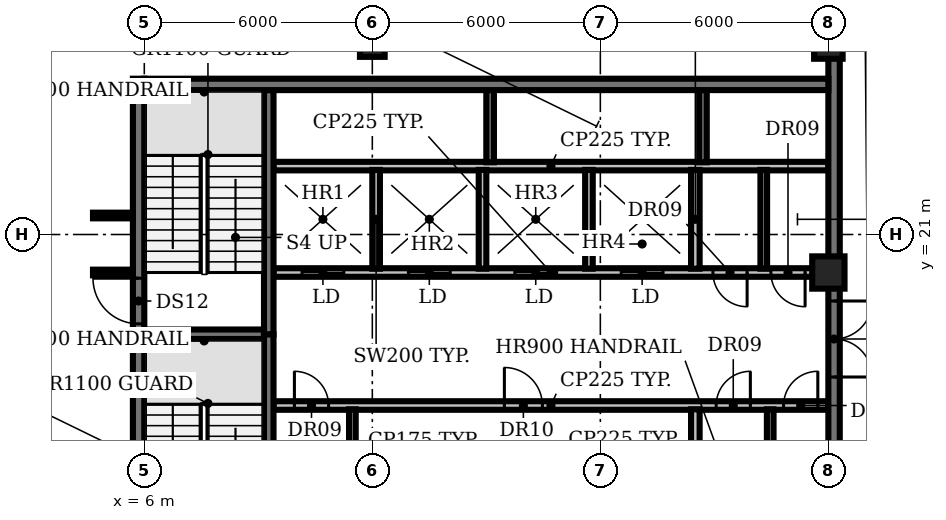
"""IFC4 building model, lengths in metres.
Left out: names, types, materials, properties, quantities, classifications, styles, units other than length and angle.
Written with IfcOpenShell. Run it as: python <this file> out.ifc"""

import sys

from ifc_helpers import new_model, si_unit, direction, frame, frame_2d, origin, origin_2d, place, context, subcontext, project, spatial, rectangle, circle, extrude, element, fill, save


model = new_model("IFC4")
c1 = context("Model", 3, precision=1e-05, world=origin(), true_north=direction((0.0, 1.0)))
c2 = subcontext(c1, "Body", "Model", "MODEL_VIEW")
j1 = project(units=[si_unit("LENGTHUNIT", "METRE"), si_unit("PLANEANGLEUNIT", "RADIAN")], contexts=[c1])
p1 = place(None, origin())
s1 = spatial("IfcSite", under=j1, at=p1, CompositionType="ELEMENT")
p2 = place(p1, origin())
s2 = spatial("IfcBuilding", under=s1, at=p2, CompositionType="ELEMENT")
p3 = place(p2, frame((0.0, 0.0, 289.4)))
s3 = spatial("IfcBuildingStorey", under=s2, at=p3, CompositionType="ELEMENT", Elevation=289.4)
p4 = place(p3, frame((12.0, 26.0, 0.0), z_axis=(0.0, 0.0, 1.0), x_axis=(1.0, 0.0, 0.0)))
e1 = element("IfcColumn", 1, at=p4, inside=s3, PredefinedType="COLUMN", context=c2, shape_type="SweptSolid", body=[
    extrude(rectangle(XDim=0.65, YDim=0.65, at=origin_2d()), origin(), (0.0, 0.0, 1.0), 3.85),
])
p5 = place(p3, frame((24.0, 20.0, 0.0), z_axis=(0.0, 0.0, 1.0), x_axis=(1.0, 0.0, 0.0)))
e2 = element("IfcColumn", 2, at=p5, inside=s3, PredefinedType="COLUMN", context=c2, shape_type="SweptSolid", body=[
    extrude(circle(Radius=0.425, at=origin_2d()), origin(), (0.0, 0.0, 1.0), 3.85),
])
p6 = place(p3, frame((24.0, 26.0, 0.0), z_axis=(0.0, 0.0, 1.0), x_axis=(1.0, 0.0, 0.0)))
e3 = element("IfcColumn", 3, at=p6, inside=s3, PredefinedType="COLUMN", context=c2, shape_type="SweptSolid", body=[
    extrude(rectangle(XDim=0.75, YDim=0.75, at=origin_2d()), origin(), (0.0, 0.0, 1.0), 3.85),
])
p7 = place(p3, frame((9.4, 16.5, 0.0), z_axis=(0.0, 0.0, 1.0), x_axis=(1.0, 0.0, 0.0)))
e4 = element("IfcWall", 4, at=p7, inside=s3, PredefinedType="PARTITIONING", context=c2, shape_type="SweptSolid", body=[
    extrude(rectangle(XDim=14.6, YDim=0.225, at=frame_2d((7.3, 0.0))), origin(), (0.0, 0.0, 1.0), 3.85),
])
p8 = place(p7, frame((0.55, 0.0, 0.0)))
e5 = element("IfcOpeningElement", 5, at=p8, cuts=e4, PredefinedType="OPENING", context=c2, shape_type="SweptSolid", body=[
    extrude(rectangle(XDim=0.9, YDim=2.1, at=frame_2d((0.45, 1.05))), frame((0.0, 0.123, 0.0), z_axis=(0.0, -1.0, 0.0), x_axis=(1.0, 0.0, 0.0)), (0.0, 0.0, 1.0), 0.245),
])
p9 = place(p7, frame((6.075, 0.0, 0.0)))
e6 = element("IfcOpeningElement", 6, at=p9, cuts=e4, PredefinedType="OPENING", context=c2, shape_type="SweptSolid", body=[
    extrude(rectangle(XDim=1.0, YDim=2.1, at=frame_2d((0.5, 1.05))), frame((0.0, 0.123, 0.0), z_axis=(0.0, -1.0, 0.0), x_axis=(1.0, 0.0, 0.0)), (0.0, 0.0, 1.0), 0.245),
])
p10 = place(p7, frame((11.647, 0.0, 0.0)))
e7 = element("IfcOpeningElement", 7, at=p10, cuts=e4, PredefinedType="OPENING", context=c2, shape_type="SweptSolid", body=[
    extrude(rectangle(XDim=0.9, YDim=2.1, at=frame_2d((0.45, 1.05))), frame((0.0, 0.123, 0.0), z_axis=(0.0, -1.0, 0.0), x_axis=(1.0, 0.0, 0.0)), (0.0, 0.0, 1.0), 0.245),
])
p11 = place(p7, frame((13.423, 0.0, 0.0)))
e8 = element("IfcOpeningElement", 8, at=p11, cuts=e4, PredefinedType="OPENING", context=c2, shape_type="SweptSolid", body=[
    extrude(rectangle(XDim=0.9, YDim=2.1, at=frame_2d((0.45, 1.05))), frame((0.0, 0.123, 0.0), z_axis=(0.0, -1.0, 0.0), x_axis=(1.0, 0.0, 0.0)), (0.0, 0.0, 1.0), 0.245),
])
p12 = place(p3, frame((6.0, 18.375, 0.0), z_axis=(0.0, 0.0, 1.0), x_axis=(1.0, 0.0, 0.0)))
e9 = element("IfcWall", 9, at=p12, inside=s3, PredefinedType="SHEAR", context=c2, shape_type="SweptSolid", body=[
    extrude(rectangle(XDim=3.15, YDim=0.25, at=frame_2d((1.575, 0.0))), origin(), (0.0, 0.0, 1.0), 3.85),
])
p13 = place(p3, frame((24.0, 20.0, 0.0), z_axis=(0.0, 0.0, 1.0), x_axis=(-1.0, 0.0, 0.0)))
e10 = element("IfcWall", 10, at=p13, inside=s3, PredefinedType="PARTITIONING", context=c2, shape_type="SweptSolid", body=[
    extrude(rectangle(XDim=14.6, YDim=0.225, at=frame_2d((7.3, 0.0))), origin(), (0.0, 0.0, 1.0), 3.85),
])
p14 = place(p13, frame((12.75, 0.0, 0.0)))
e11 = element("IfcOpeningElement", 11, at=p14, cuts=e10, PredefinedType="OPENING", context=c2, shape_type="SweptSolid", body=[
    extrude(rectangle(XDim=1.1, YDim=2.1, at=frame_2d((0.55, 1.05))), frame((0.0, 0.123, 0.0), z_axis=(0.0, -1.0, 0.0), x_axis=(1.0, 0.0, 0.0)), (0.0, 0.0, 1.0), 0.245),
])
p15 = place(p13, frame((9.95, 0.0, 0.0)))
e12 = element("IfcOpeningElement", 12, at=p15, cuts=e10, PredefinedType="OPENING", context=c2, shape_type="SweptSolid", body=[
    extrude(rectangle(XDim=1.1, YDim=2.1, at=frame_2d((0.55, 1.05))), frame((0.0, 0.123, 0.0), z_axis=(0.0, -1.0, 0.0), x_axis=(1.0, 0.0, 0.0)), (0.0, 0.0, 1.0), 0.245),
])
p16 = place(p13, frame((7.15, 0.0, 0.0)))
e13 = element("IfcOpeningElement", 13, at=p16, cuts=e10, PredefinedType="OPENING", context=c2, shape_type="SweptSolid", body=[
    extrude(rectangle(XDim=1.1, YDim=2.1, at=frame_2d((0.55, 1.05))), frame((0.0, 0.123, 0.0), z_axis=(0.0, -1.0, 0.0), x_axis=(1.0, 0.0, 0.0)), (0.0, 0.0, 1.0), 0.245),
])
p17 = place(p13, frame((4.35, 0.0, 0.0)))
e14 = element("IfcOpeningElement", 14, at=p17, cuts=e10, PredefinedType="OPENING", context=c2, shape_type="SweptSolid", body=[
    extrude(rectangle(XDim=1.1, YDim=2.1, at=frame_2d((0.55, 1.05))), frame((0.0, 0.123, 0.0), z_axis=(0.0, -1.0, 0.0), x_axis=(1.0, 0.0, 0.0)), (0.0, 0.0, 1.0), 0.245),
])
p18 = place(p13, frame((2.137, 0.0, 0.0)))
e15 = element("IfcOpeningElement", 15, at=p18, cuts=e10, PredefinedType="OPENING", context=c2, shape_type="SweptSolid", body=[
    extrude(rectangle(XDim=0.9, YDim=2.1, at=frame_2d((0.45, 1.05))), frame((0.0, 0.123, 0.0), z_axis=(0.0, -1.0, 0.0), x_axis=(1.0, 0.0, 0.0)), (0.0, 0.0, 1.0), 0.245),
])
p19 = place(p13, frame((0.612, 0.0, 0.0)))
e16 = element("IfcOpeningElement", 16, at=p19, cuts=e10, PredefinedType="OPENING", context=c2, shape_type="SweptSolid", body=[
    extrude(rectangle(XDim=0.9, YDim=2.1, at=frame_2d((0.45, 1.05))), frame((0.0, 0.123, 0.0), z_axis=(0.0, -1.0, 0.0), x_axis=(1.0, 0.0, 0.0)), (0.0, 0.0, 1.0), 0.245),
])
p20 = place(p3, frame((9.4, 22.8, 0.0), z_axis=(0.0, 0.0, 1.0), x_axis=(1.0, 0.0, 0.0)))
e17 = element("IfcWall", 17, at=p20, inside=s3, PredefinedType="PARTITIONING", context=c2, shape_type="SweptSolid", body=[
    extrude(rectangle(XDim=14.6, YDim=0.225, at=frame_2d((7.3, 0.0))), origin(), (0.0, 0.0, 1.0), 3.85),
])
p21 = place(p3, frame((9.275, 18.375, 0.0), z_axis=(0.0, 0.0, 1.0), x_axis=(0.0, -1.0, 0.0)))
e18 = element("IfcWall", 18, at=p21, inside=s3, PredefinedType="SHEAR", context=c2, shape_type="SweptSolid", body=[
    extrude(rectangle(XDim=6.55, YDim=0.25, at=frame_2d((3.275, 0.0))), origin(), (0.0, 0.0, 1.0), 3.85),
])
p22 = place(p21, frame((5.075, 0.0, 0.0)))
e19 = element("IfcOpeningElement", 19, at=p22, cuts=e18, PredefinedType="OPENING", context=c2, shape_type="SweptSolid", body=[
    extrude(rectangle(XDim=1.0, YDim=2.1, at=frame_2d((0.5, 1.05))), frame((0.0, 0.135, 0.0), z_axis=(0.0, -1.0, 0.0), x_axis=(1.0, 0.0, 0.0)), (0.0, 0.0, 1.0), 0.27),
])
p23 = place(p3, frame((9.275, 18.375, 0.0), z_axis=(0.0, 0.0, 1.0), x_axis=(0.0, 1.0, 0.0)))
e20 = element("IfcWall", 20, at=p23, inside=s3, PredefinedType="SHEAR", context=c2, shape_type="SweptSolid", body=[
    extrude(rectangle(XDim=6.425, YDim=0.25, at=frame_2d((3.212, 0.0))), origin(), (0.0, 0.0, 1.0), 3.85),
])
p24 = place(p3, frame((11.475, 13.8, 0.0), z_axis=(0.0, 0.0, 1.0), x_axis=(0.0, 1.0, 0.0)))
e21 = element("IfcWall", 21, at=p24, inside=s3, PredefinedType="PARTITIONING", context=c2, shape_type="SweptSolid", body=[
    extrude(rectangle(XDim=2.6, YDim=0.175, at=frame_2d((1.3, 0.0))), origin(), (0.0, 0.0, 1.0), 3.85),
])
for number, where, z_axis, x_axis in (
    (22, (12.1, 20.1, 0.0), (0.0, 0.0, 1.0), (0.0, 1.0, 0.0)),
    (23, (14.9, 20.1, 0.0), (0.0, 0.0, 1.0), (0.0, 1.0, 0.0)),
):
    element("IfcWall", number, at=place(p3, frame(where, z_axis=z_axis, x_axis=x_axis)), inside=s3, PredefinedType="SOLIDWALL", context=c2, shape_type="SweptSolid", body=[
        extrude(rectangle(XDim=2.6, YDim=0.2, at=frame_2d((1.3, 0.0))), origin(), (0.0, 0.0, 1.0), 3.85),
    ])
p25 = place(p3, frame((15.1, 22.9, 0.0), z_axis=(0.0, 0.0, 1.0), x_axis=(0.0, 1.0, 0.0)))
e24 = element("IfcWall", 24, at=p25, inside=s3, PredefinedType="SHEAR", context=c2, shape_type="SweptSolid", body=[
    extrude(rectangle(XDim=1.9, YDim=0.2, at=frame_2d((0.95, 0.0))), origin(), (0.0, 0.0, 1.0), 3.85),
])
p26 = place(p3, frame((17.7, 20.1, 0.0), z_axis=(0.0, 0.0, 1.0), x_axis=(0.0, 1.0, 0.0)))
e25 = element("IfcWall", 25, at=p26, inside=s3, PredefinedType="SOLIDWALL", context=c2, shape_type="SweptSolid", body=[
    extrude(rectangle(XDim=2.6, YDim=0.2, at=frame_2d((1.3, 0.0))), origin(), (0.0, 0.0, 1.0), 3.85),
])
for number, where, z_axis, x_axis in (
    (26, (20.5, 13.8, 0.0), (0.0, 0.0, 1.0), (0.0, 1.0, 0.0)),
    (27, (20.5, 20.1, 0.0), (0.0, 0.0, 1.0), (0.0, 1.0, 0.0)),
):
    element("IfcWall", number, at=place(p3, frame(where, z_axis=z_axis, x_axis=x_axis)), inside=s3, PredefinedType="PARTITIONING", context=c2, shape_type="SweptSolid", body=[
        extrude(rectangle(XDim=2.6, YDim=0.225, at=frame_2d((1.3, 0.0))), origin(), (0.0, 0.0, 1.0), 3.85),
    ])
p27 = place(p3, frame((20.7, 22.9, 0.0), z_axis=(0.0, 0.0, 1.0), x_axis=(0.0, 1.0, 0.0)))
e28 = element("IfcWall", 28, at=p27, inside=s3, PredefinedType="SHEAR", context=c2, shape_type="SweptSolid", body=[
    extrude(rectangle(XDim=1.9, YDim=0.2, at=frame_2d((0.95, 0.0))), origin(), (0.0, 0.0, 1.0), 3.85),
])
for number, where, z_axis, x_axis in (
    (29, (22.3, 20.1, 0.0), (0.0, 0.0, 1.0), (0.0, 1.0, 0.0)),
    (30, (22.47, 13.8, 0.0), (0.0, 0.0, 1.0), (0.0, 1.0, 0.0)),
):
    element("IfcWall", number, at=place(p3, frame(where, z_axis=z_axis, x_axis=x_axis)), inside=s3, PredefinedType="PARTITIONING", context=c2, shape_type="SweptSolid", body=[
        extrude(rectangle(XDim=2.6, YDim=0.175, at=frame_2d((1.3, 0.0))), origin(), (0.0, 0.0, 1.0), 3.85),
    ])
p28 = place(p3, frame((5.85, 5.1, 0.0), z_axis=(0.0, 0.0, 1.0), x_axis=(0.0, 1.0, 0.0)))
e31 = element("IfcWall", 31, at=p28, inside=s3, PredefinedType="SHEAR", context=c2, shape_type="SweptSolid", body=[
    extrude(rectangle(XDim=20.0, YDim=0.3, at=frame_2d((10.0, 0.0))), origin(), (0.0, 0.0, 1.0), 3.85),
])
p29 = place(p28, frame((0.55, 0.0, 0.0)))
e32 = element("IfcOpeningElement", 32, at=p29, cuts=e31, PredefinedType="OPENING", context=c2, shape_type="SweptSolid", body=[
    extrude(rectangle(XDim=1.5, YDim=2.1, at=frame_2d((0.75, 1.05))), frame((0.0, 0.16, 0.0), z_axis=(0.0, -1.0, 0.0), x_axis=(1.0, 0.0, 0.0)), (0.0, 0.0, 1.0), 0.32),
])
p30 = place(p28, frame((7.0, 0.0, 0.0)))
e33 = element("IfcOpeningElement", 33, at=p30, cuts=e31, PredefinedType="OPENING", context=c2, shape_type="SweptSolid", body=[
    extrude(rectangle(XDim=1.2, YDim=2.1, at=frame_2d((0.6, 1.05))), frame((0.0, 0.16, 0.0), z_axis=(0.0, -1.0, 0.0), x_axis=(1.0, 0.0, 0.0)), (0.0, 0.0, 1.0), 0.32),
])
p31 = place(p28, frame((13.55, 0.0, 0.0)))
e34 = element("IfcOpeningElement", 34, at=p31, cuts=e31, PredefinedType="OPENING", context=c2, shape_type="SweptSolid", body=[
    extrude(rectangle(XDim=1.2, YDim=2.1, at=frame_2d((0.6, 1.05))), frame((0.0, 0.16, 0.0), z_axis=(0.0, -1.0, 0.0), x_axis=(1.0, 0.0, 0.0)), (0.0, 0.0, 1.0), 0.32),
])
p32 = place(p3, frame((24.15, 25.655, 0.0), z_axis=(0.0, 0.0, 1.0), x_axis=(0.0, -1.0, 0.0)))
e35 = element("IfcWall", 35, at=p32, inside=s3, PredefinedType="SHEAR", context=c2, shape_type="SweptSolid", body=[
    extrude(rectangle(XDim=20.555, YDim=0.3, at=frame_2d((10.277, 0.0))), origin(), (0.0, 0.0, 1.0), 3.85),
])
p33 = place(p32, frame((18.505, 0.0, 0.0)))
e36 = element("IfcOpeningElement", 36, at=p33, cuts=e35, PredefinedType="OPENING", context=c2, shape_type="SweptSolid", body=[
    extrude(rectangle(XDim=1.5, YDim=2.1, at=frame_2d((0.75, 1.05))), frame((0.0, 0.16, 0.0), z_axis=(0.0, -1.0, 0.0), x_axis=(1.0, 0.0, 0.0)), (0.0, 0.0, 1.0), 0.32),
])
p34 = place(p32, frame((12.405, 0.0, 0.0)))
e37 = element("IfcOpeningElement", 37, at=p34, cuts=e35, PredefinedType="OPENING", context=c2, shape_type="SweptSolid", body=[
    extrude(rectangle(XDim=0.9, YDim=2.1, at=frame_2d((0.45, 1.05))), frame((0.0, 0.16, 0.0), z_axis=(0.0, -1.0, 0.0), x_axis=(1.0, 0.0, 0.0)), (0.0, 0.0, 1.0), 0.32),
])
p35 = place(p32, frame((6.405, 0.0, 0.0)))
e38 = element("IfcOpeningElement", 38, at=p35, cuts=e35, PredefinedType="OPENING", context=c2, shape_type="SweptSolid", body=[
    extrude(rectangle(XDim=2.0, YDim=2.1, at=frame_2d((1.0, 1.05))), frame((0.0, 0.16, 0.0), z_axis=(0.0, -1.0, 0.0), x_axis=(1.0, 0.0, 0.0)), (0.0, 0.0, 1.0), 0.32),
])
p36 = place(p3, frame((6.0, 24.95, 0.0), z_axis=(0.0, 0.0, 1.0), x_axis=(1.0, 0.0, 0.0)))
e39 = element("IfcWall", 39, at=p36, inside=s3, PredefinedType="SHEAR", context=c2, shape_type="SweptSolid", body=[
    extrude(rectangle(XDim=18.0, YDim=0.3, at=frame_2d((9.0, 0.0))), origin(), (0.0, 0.0, 1.0), 3.85),
])
for number, where, z_axis, x_axis in (
    (40, (4.65, 20.0, 0.0), (0.0, 0.0, 1.0), (1.0, 0.0, 0.0)),
    (41, (4.65, 21.5, 0.0), (0.0, 0.0, 1.0), (1.0, 0.0, 0.0)),
):
    element("IfcWall", number, at=place(p3, frame(where, z_axis=z_axis, x_axis=x_axis)), inside=s3, PredefinedType="PARTITIONING", context=c2, shape_type="SweptSolid", body=[
        extrude(rectangle(XDim=1.05, YDim=0.15, at=frame_2d((0.525, 0.0))), origin(), (0.0, 0.0, 1.0), 2.9),
    ])
p37 = place(p8, origin())
e42 = element("IfcDoor", 42, at=p37, inside=s3, OperationType="SINGLE_SWING_LEFT", PredefinedType="DOOR", context=c2, shape_type="SweptSolid", body=[
    extrude(rectangle(XDim=0.9, YDim=2.1, at=frame_2d((0.45, 1.05))), frame((0.0, 0.025, 0.0), z_axis=(0.0, -1.0, 0.0), x_axis=(1.0, 0.0, 0.0)), (0.0, 0.0, 1.0), 0.05),
])
fill(e5, e42)
p38 = place(p9, origin())
e43 = element("IfcDoor", 43, at=p38, inside=s3, OperationType="SINGLE_SWING_LEFT", PredefinedType="DOOR", context=c2, shape_type="SweptSolid", body=[
    extrude(rectangle(XDim=1.0, YDim=2.1, at=frame_2d((0.5, 1.05))), frame((0.0, 0.025, 0.0), z_axis=(0.0, -1.0, 0.0), x_axis=(1.0, 0.0, 0.0)), (0.0, 0.0, 1.0), 0.05),
])
fill(e6, e43)
p39 = place(p10, origin())
e44 = element("IfcDoor", 44, at=p39, inside=s3, OperationType="SINGLE_SWING_RIGHT", PredefinedType="DOOR", context=c2, shape_type="SweptSolid", body=[
    extrude(rectangle(XDim=0.9, YDim=2.1, at=frame_2d((0.45, 1.05))), frame((0.0, 0.025, 0.0), z_axis=(0.0, -1.0, 0.0), x_axis=(1.0, 0.0, 0.0)), (0.0, 0.0, 1.0), 0.05),
])
fill(e7, e44)
p40 = place(p11, origin())
e45 = element("IfcDoor", 45, at=p40, inside=s3, OperationType="SINGLE_SWING_RIGHT", PredefinedType="DOOR", context=c2, shape_type="SweptSolid", body=[
    extrude(rectangle(XDim=0.9, YDim=2.1, at=frame_2d((0.45, 1.05))), frame((0.0, 0.025, 0.0), z_axis=(0.0, -1.0, 0.0), x_axis=(1.0, 0.0, 0.0)), (0.0, 0.0, 1.0), 0.05),
])
fill(e8, e45)
p41 = place(p14, origin())
e46 = element("IfcDoor", 46, at=p41, inside=s3, OperationType="DOUBLE_DOOR_SLIDING", PredefinedType="DOOR", context=c2, shape_type="SweptSolid", body=[
    extrude(rectangle(XDim=1.1, YDim=2.1, at=frame_2d((0.55, 1.05))), frame((0.0, 0.025, 0.0), z_axis=(0.0, -1.0, 0.0), x_axis=(1.0, 0.0, 0.0)), (0.0, 0.0, 1.0), 0.05),
])
fill(e11, e46)
p42 = place(p15, origin())
e47 = element("IfcDoor", 47, at=p42, inside=s3, OperationType="DOUBLE_DOOR_SLIDING", PredefinedType="DOOR", context=c2, shape_type="SweptSolid", body=[
    extrude(rectangle(XDim=1.1, YDim=2.1, at=frame_2d((0.55, 1.05))), frame((0.0, 0.025, 0.0), z_axis=(0.0, -1.0, 0.0), x_axis=(1.0, 0.0, 0.0)), (0.0, 0.0, 1.0), 0.05),
])
fill(e12, e47)
p43 = place(p16, origin())
e48 = element("IfcDoor", 48, at=p43, inside=s3, OperationType="DOUBLE_DOOR_SLIDING", PredefinedType="DOOR", context=c2, shape_type="SweptSolid", body=[
    extrude(rectangle(XDim=1.1, YDim=2.1, at=frame_2d((0.55, 1.05))), frame((0.0, 0.025, 0.0), z_axis=(0.0, -1.0, 0.0), x_axis=(1.0, 0.0, 0.0)), (0.0, 0.0, 1.0), 0.05),
])
fill(e13, e48)
p44 = place(p17, origin())
e49 = element("IfcDoor", 49, at=p44, inside=s3, OperationType="DOUBLE_DOOR_SLIDING", PredefinedType="DOOR", context=c2, shape_type="SweptSolid", body=[
    extrude(rectangle(XDim=1.1, YDim=2.1, at=frame_2d((0.55, 1.05))), frame((0.0, 0.025, 0.0), z_axis=(0.0, -1.0, 0.0), x_axis=(1.0, 0.0, 0.0)), (0.0, 0.0, 1.0), 0.05),
])
fill(e14, e49)
p45 = place(p18, origin())
e50 = element("IfcDoor", 50, at=p45, inside=s3, OperationType="SINGLE_SWING_LEFT", PredefinedType="DOOR", context=c2, shape_type="SweptSolid", body=[
    extrude(rectangle(XDim=0.9, YDim=2.1, at=frame_2d((0.45, 1.05))), frame((0.0, 0.025, 0.0), z_axis=(0.0, -1.0, 0.0), x_axis=(1.0, 0.0, 0.0)), (0.0, 0.0, 1.0), 0.05),
])
fill(e15, e50)
p46 = place(p19, origin())
e51 = element("IfcDoor", 51, at=p46, inside=s3, OperationType="SINGLE_SWING_LEFT", PredefinedType="DOOR", context=c2, shape_type="SweptSolid", body=[
    extrude(rectangle(XDim=0.9, YDim=2.1, at=frame_2d((0.45, 1.05))), frame((0.0, 0.025, 0.0), z_axis=(0.0, -1.0, 0.0), x_axis=(1.0, 0.0, 0.0)), (0.0, 0.0, 1.0), 0.05),
])
fill(e16, e51)
p47 = place(p31, origin())
e52 = element("IfcDoor", 52, at=p47, inside=s3, OperationType="SINGLE_SWING_RIGHT", PredefinedType="DOOR", context=c2, shape_type="SweptSolid", body=[
    extrude(rectangle(XDim=1.2, YDim=2.1, at=frame_2d((0.6, 1.05))), frame((0.0, 0.025, 0.0), z_axis=(0.0, -1.0, 0.0), x_axis=(1.0, 0.0, 0.0)), (0.0, 0.0, 1.0), 0.05),
])
fill(e34, e52)
p48 = place(p35, origin())
e53 = element("IfcDoor", 53, at=p48, inside=s3, OperationType="DOUBLE_DOOR_SINGLE_SWING", PredefinedType="DOOR", context=c2, shape_type="SweptSolid", body=[
    extrude(rectangle(XDim=2.0, YDim=2.1, at=frame_2d((1.0, 1.05))), frame((0.0, 0.025, 0.0), z_axis=(0.0, -1.0, 0.0), x_axis=(1.0, 0.0, 0.0)), (0.0, 0.0, 1.0), 0.05),
])
fill(e38, e53)
save(model, sys.argv[1])
